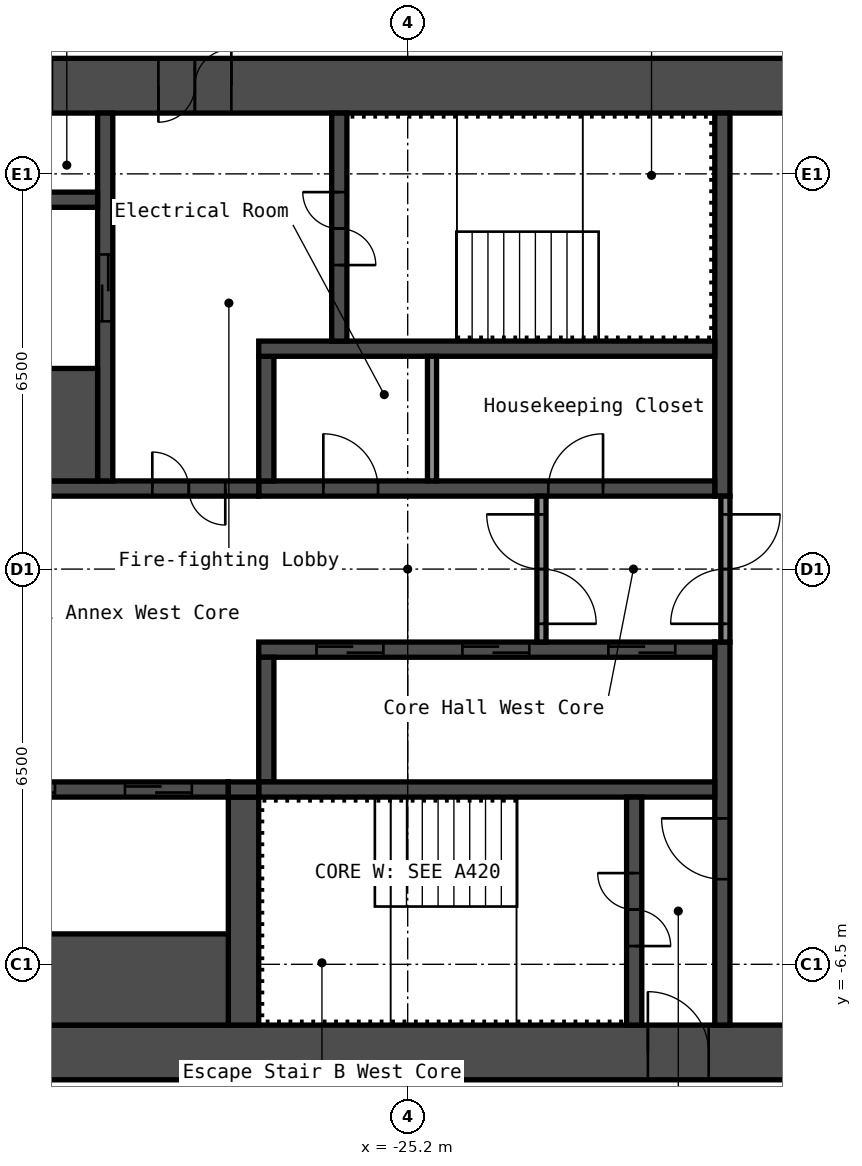
"""IFC4 building model, lengths in metres.
Left out: names, types, materials, properties, quantities, classifications, styles, units other than length and angle.
Written with IfcOpenShell. Run it as: python <this file> out.ifc"""

import sys

from ifc_helpers import new_model, si_unit, direction, frame, frame_2d, origin, place, context, subcontext, project, spatial, rectangle, extrude, element, fill, save


model = new_model("IFC4")
c1 = context("Model", 3, precision=1e-05, world=origin(), true_north=direction((0.0, 1.0)))
c2 = subcontext(c1, "Body", "Model", "MODEL_VIEW")
j1 = project(units=[si_unit("LENGTHUNIT", "METRE"), si_unit("PLANEANGLEUNIT", "RADIAN")], contexts=[c1])
p1 = place(None, origin())
s1 = spatial("IfcSite", under=j1, at=p1, CompositionType="ELEMENT")
p2 = place(p1, origin())
s2 = spatial("IfcBuilding", under=s1, at=p2, CompositionType="ELEMENT")
p3 = place(p2, frame((0.0, 0.0, 131.0)))
s3 = spatial("IfcBuildingStorey", under=s2, at=p3, CompositionType="ELEMENT", Elevation=131.0)
p4 = place(p3, frame((-32.7, 7.95, 0.0), z_axis=(0.0, 0.0, 1.0), x_axis=(1.0, 0.0, 0.0)))
e1 = element("IfcWall", 1, at=p4, inside=s3, PredefinedType="SHEAR", context=c2, shape_type="SweptSolid", body=[
    extrude(rectangle(XDim=15.0, YDim=0.9, at=frame_2d((7.5, 0.0))), origin(), (0.0, 0.0, 1.0), 2.75),
])
p5 = place(p4, frame((3.4, 0.0, 0.0)))
e2 = element("IfcOpeningElement", 2, at=p5, cuts=e1, PredefinedType="OPENING", context=c2, shape_type="SweptSolid", body=[
    extrude(rectangle(XDim=1.2, YDim=2.1, at=frame_2d((0.6, 1.05))), frame((0.0, 0.46, 0.0), z_axis=(0.0, -1.0, 0.0), x_axis=(1.0, 0.0, 0.0)), (0.0, 0.0, 1.0), 0.92),
])
p6 = place(p4, frame((0.75, 0.0, 0.0)))
e3 = element("IfcOpeningElement", 3, at=p6, cuts=e1, PredefinedType="OPENING", context=c2, shape_type="SweptSolid", body=[
    extrude(rectangle(XDim=0.9, YDim=2.1, at=frame_2d((0.45, 1.05))), frame((0.0, 0.46, 0.0), z_axis=(0.0, -1.0, 0.0), x_axis=(1.0, 0.0, 0.0)), (0.0, 0.0, 1.0), 0.92),
])
p7 = place(p3, frame((-32.7, -7.95, 0.0), z_axis=(0.0, 0.0, 1.0), x_axis=(1.0, 0.0, 0.0)))
e4 = element("IfcWall", 4, at=p7, inside=s3, PredefinedType="SHEAR", context=c2, shape_type="SweptSolid", body=[
    extrude(rectangle(XDim=15.0, YDim=0.9, at=frame_2d((7.5, 0.0))), origin(), (0.0, 0.0, 1.0), 2.75),
])
p8 = place(p7, frame((11.45, 0.0, 0.0)))
e5 = element("IfcOpeningElement", 5, at=p8, cuts=e4, PredefinedType="OPENING", context=c2, shape_type="SweptSolid", body=[
    extrude(rectangle(XDim=1.0, YDim=2.1, at=frame_2d((0.5, 1.05))), frame((0.0, 0.46, 0.0), z_axis=(0.0, -1.0, 0.0), x_axis=(1.0, 0.0, 0.0)), (0.0, 0.0, 1.0), 0.92),
])
p9 = place(p3, frame((-20.025, 1.2, 0.0), z_axis=(0.0, 0.0, 1.0), x_axis=(0.0, 1.0, 0.0)))
e6 = element("IfcWall", 6, at=p9, inside=s3, PredefinedType="SHEAR", context=c2, shape_type="SweptSolid", body=[
    extrude(rectangle(XDim=6.3, YDim=0.25, at=frame_2d((3.15, 0.0))), origin(), (0.0, 0.0, 1.0), 2.75),
])
p10 = place(p3, frame((-20.025, -7.5, 0.0), z_axis=(0.0, 0.0, 1.0), x_axis=(0.0, 1.0, 0.0)))
e7 = element("IfcWall", 7, at=p10, inside=s3, PredefinedType="SHEAR", context=c2, shape_type="SweptSolid", body=[
    extrude(rectangle(XDim=6.3, YDim=0.25, at=frame_2d((3.15, 0.0))), origin(), (0.0, 0.0, 1.0), 2.75),
])
p11 = place(p10, frame((2.4, 0.0, 0.0)))
e8 = element("IfcOpeningElement", 8, at=p11, cuts=e7, PredefinedType="OPENING", context=c2, shape_type="SweptSolid", body=[
    extrude(rectangle(XDim=1.0, YDim=2.1, at=frame_2d((0.5, 1.05))), frame((0.0, 0.135, 0.0), z_axis=(0.0, -1.0, 0.0), x_axis=(1.0, 0.0, 0.0)), (0.0, 0.0, 1.0), 0.27),
])
p12 = place(p3, frame((-27.65, 1.325, 0.0), z_axis=(0.0, 0.0, 1.0), x_axis=(1.0, 0.0, 0.0)))
e9 = element("IfcWall", 9, at=p12, inside=s3, PredefinedType="SHEAR", context=c2, shape_type="SweptSolid", body=[
    extrude(rectangle(XDim=7.5, YDim=0.25, at=frame_2d((3.75, 0.0))), origin(), (0.0, 0.0, 1.0), 2.75),
])
p13 = place(p12, frame((4.762, 0.0, 0.0)))
e10 = element("IfcOpeningElement", 10, at=p13, cuts=e9, PredefinedType="OPENING", context=c2, shape_type="SweptSolid", body=[
    extrude(rectangle(XDim=0.9, YDim=2.1, at=frame_2d((0.45, 1.05))), frame((0.0, 0.135, 0.0), z_axis=(0.0, -1.0, 0.0), x_axis=(1.0, 0.0, 0.0)), (0.0, 0.0, 1.0), 0.27),
])
p14 = place(p12, frame((1.062, 0.0, 0.0)))
e11 = element("IfcOpeningElement", 11, at=p14, cuts=e9, PredefinedType="OPENING", context=c2, shape_type="SweptSolid", body=[
    extrude(rectangle(XDim=0.9, YDim=2.1, at=frame_2d((0.45, 1.05))), frame((0.0, 0.135, 0.0), z_axis=(0.0, -1.0, 0.0), x_axis=(1.0, 0.0, 0.0)), (0.0, 0.0, 1.0), 0.27),
])
p15 = place(p3, frame((-27.525, 1.45, 0.0), z_axis=(0.0, 0.0, 1.0), x_axis=(0.0, 1.0, 0.0)))
e12 = element("IfcWall", 12, at=p15, inside=s3, PredefinedType="SHEAR", context=c2, shape_type="SweptSolid", body=[
    extrude(rectangle(XDim=2.05, YDim=0.25, at=frame_2d((1.025, 0.0))), origin(), (0.0, 0.0, 1.0), 2.75),
])
p16 = place(p3, frame((-27.65, 3.625, 0.0), z_axis=(0.0, 0.0, 1.0), x_axis=(1.0, 0.0, 0.0)))
e13 = element("IfcWall", 13, at=p16, inside=s3, PredefinedType="SHEAR", context=c2, shape_type="SweptSolid", body=[
    extrude(rectangle(XDim=7.5, YDim=0.25, at=frame_2d((3.75, 0.0))), origin(), (0.0, 0.0, 1.0), 2.75),
])
p17 = place(p3, frame((-26.325, 3.75, 0.0), z_axis=(0.0, 0.0, 1.0), x_axis=(0.0, 1.0, 0.0)))
e14 = element("IfcWall", 14, at=p17, inside=s3, PredefinedType="SHEAR", context=c2, shape_type="SweptSolid", body=[
    extrude(rectangle(XDim=3.75, YDim=0.25, at=frame_2d((1.875, 0.0))), origin(), (0.0, 0.0, 1.0), 2.75),
])
p18 = place(p17, frame((1.25, 0.0, 0.0)))
e15 = element("IfcOpeningElement", 15, at=p18, cuts=e14, PredefinedType="OPENING", context=c2, shape_type="SweptSolid", body=[
    extrude(rectangle(XDim=1.2, YDim=2.1, at=frame_2d((0.6, 1.05))), frame((0.0, 0.135, 0.0), z_axis=(0.0, -1.0, 0.0), x_axis=(1.0, 0.0, 0.0)), (0.0, 0.0, 1.0), 0.27),
])
p19 = place(p3, frame((-32.7, 1.325, 0.0), z_axis=(0.0, 0.0, 1.0), x_axis=(1.0, 0.0, 0.0)))
e16 = element("IfcWall", 16, at=p19, inside=s3, PredefinedType="SHEAR", context=c2, shape_type="SweptSolid", body=[
    extrude(rectangle(XDim=5.05, YDim=0.25, at=frame_2d((2.525, 0.0))), origin(), (0.0, 0.0, 1.0), 2.75),
])
p20 = place(p19, frame((3.3, 0.0, 0.0)))
e17 = element("IfcOpeningElement", 17, at=p20, cuts=e16, PredefinedType="OPENING", context=c2, shape_type="SweptSolid", body=[
    extrude(rectangle(XDim=1.2, YDim=2.1, at=frame_2d((0.6, 1.05))), frame((0.0, 0.135, 0.0), z_axis=(0.0, -1.0, 0.0), x_axis=(1.0, 0.0, 0.0)), (0.0, 0.0, 1.0), 0.27),
])
p21 = place(p3, frame((-30.175, 1.45, 0.0), z_axis=(0.0, 0.0, 1.0), x_axis=(0.0, 1.0, 0.0)))
e18 = element("IfcWall", 18, at=p21, inside=s3, PredefinedType="SHEAR", context=c2, shape_type="SweptSolid", body=[
    extrude(rectangle(XDim=6.05, YDim=0.25, at=frame_2d((3.025, 0.0))), origin(), (0.0, 0.0, 1.0), 2.75),
])
p22 = place(p21, frame((2.625, 0.0, 0.0)))
e19 = element("IfcOpeningElement", 19, at=p22, cuts=e18, PredefinedType="OPENING", context=c2, shape_type="SweptSolid", body=[
    extrude(rectangle(XDim=1.1, YDim=2.1, at=frame_2d((0.55, 1.05))), frame((0.0, 0.135, 0.0), z_axis=(0.0, -1.0, 0.0), x_axis=(1.0, 0.0, 0.0)), (0.0, 0.0, 1.0), 0.27),
])
p23 = place(p3, frame((-32.7, 2.375, 0.0), z_axis=(0.0, 0.0, 1.0), x_axis=(1.0, 0.0, 0.0)))
e20 = element("IfcWall", 20, at=p23, inside=s3, PredefinedType="SHEAR", context=c2, shape_type="SweptSolid", body=[
    extrude(rectangle(XDim=2.4, YDim=1.85, at=frame_2d((1.2, 0.0))), origin(), (0.0, 0.0, 1.0), 2.75),
])
p24 = place(p3, frame((-32.7, 6.075, 0.0), z_axis=(0.0, 0.0, 1.0), x_axis=(1.0, 0.0, 0.0)))
e21 = element("IfcWall", 21, at=p24, inside=s3, PredefinedType="SHEAR", context=c2, shape_type="SweptSolid", body=[
    extrude(rectangle(XDim=2.4, YDim=0.25, at=frame_2d((1.2, 0.0))), origin(), (0.0, 0.0, 1.0), 2.75),
])
p25 = place(p3, frame((-27.65, -1.325, 0.0), z_axis=(0.0, 0.0, 1.0), x_axis=(1.0, 0.0, 0.0)))
e22 = element("IfcWall", 22, at=p25, inside=s3, PredefinedType="SHEAR", context=c2, shape_type="SweptSolid", body=[
    extrude(rectangle(XDim=7.5, YDim=0.25, at=frame_2d((3.75, 0.0))), origin(), (0.0, 0.0, 1.0), 2.75),
])
p26 = place(p25, frame((5.75, 0.0, 0.0)))
e23 = element("IfcOpeningElement", 23, at=p26, cuts=e22, PredefinedType="OPENING", context=c2, shape_type="SweptSolid", body=[
    extrude(rectangle(XDim=1.1, YDim=2.1, at=frame_2d((0.55, 1.05))), frame((0.0, 0.135, 0.0), z_axis=(0.0, -1.0, 0.0), x_axis=(1.0, 0.0, 0.0)), (0.0, 0.0, 1.0), 0.27),
])
p27 = place(p25, frame((3.35, 0.0, 0.0)))
e24 = element("IfcOpeningElement", 24, at=p27, cuts=e22, PredefinedType="OPENING", context=c2, shape_type="SweptSolid", body=[
    extrude(rectangle(XDim=1.1, YDim=2.1, at=frame_2d((0.55, 1.05))), frame((0.0, 0.135, 0.0), z_axis=(0.0, -1.0, 0.0), x_axis=(1.0, 0.0, 0.0)), (0.0, 0.0, 1.0), 0.27),
])
p28 = place(p25, frame((0.95, 0.0, 0.0)))
e25 = element("IfcOpeningElement", 25, at=p28, cuts=e22, PredefinedType="OPENING", context=c2, shape_type="SweptSolid", body=[
    extrude(rectangle(XDim=1.1, YDim=2.1, at=frame_2d((0.55, 1.05))), frame((0.0, 0.135, 0.0), z_axis=(0.0, -1.0, 0.0), x_axis=(1.0, 0.0, 0.0)), (0.0, 0.0, 1.0), 0.27),
])
p29 = place(p3, frame((-27.525, -3.5, 0.0), z_axis=(0.0, 0.0, 1.0), x_axis=(0.0, 1.0, 0.0)))
e26 = element("IfcWall", 26, at=p29, inside=s3, PredefinedType="SHEAR", context=c2, shape_type="SweptSolid", body=[
    extrude(rectangle(XDim=2.05, YDim=0.25, at=frame_2d((1.025, 0.0))), origin(), (0.0, 0.0, 1.0), 2.75),
])
p30 = place(p3, frame((-27.65, -3.625, 0.0), z_axis=(0.0, 0.0, 1.0), x_axis=(1.0, 0.0, 0.0)))
e27 = element("IfcWall", 27, at=p30, inside=s3, PredefinedType="SHEAR", context=c2, shape_type="SweptSolid", body=[
    extrude(rectangle(XDim=7.5, YDim=0.25, at=frame_2d((3.75, 0.0))), origin(), (0.0, 0.0, 1.0), 2.75),
])
p31 = place(p3, frame((-21.475, -7.5, 0.0), z_axis=(0.0, 0.0, 1.0), x_axis=(0.0, 1.0, 0.0)))
e28 = element("IfcWall", 28, at=p31, inside=s3, PredefinedType="SHEAR", context=c2, shape_type="SweptSolid", body=[
    extrude(rectangle(XDim=3.75, YDim=0.25, at=frame_2d((1.875, 0.0))), origin(), (0.0, 0.0, 1.0), 2.75),
])
p32 = place(p31, frame((1.3, 0.0, 0.0)))
e29 = element("IfcOpeningElement", 29, at=p32, cuts=e28, PredefinedType="OPENING", context=c2, shape_type="SweptSolid", body=[
    extrude(rectangle(XDim=1.2, YDim=2.1, at=frame_2d((0.6, 1.05))), frame((0.0, 0.135, 0.0), z_axis=(0.0, -1.0, 0.0), x_axis=(1.0, 0.0, 0.0)), (0.0, 0.0, 1.0), 0.27),
])
p33 = place(p3, frame((-27.9, -7.5, 0.0), z_axis=(0.0, 0.0, 1.0), x_axis=(0.0, 1.0, 0.0)))
e30 = element("IfcWall", 30, at=p33, inside=s3, PredefinedType="SHEAR", context=c2, shape_type="SweptSolid", body=[
    extrude(rectangle(XDim=3.75, YDim=0.5, at=frame_2d((1.875, 0.0))), origin(), (0.0, 0.0, 1.0), 2.75),
])
p34 = place(p3, frame((-32.7, -3.625, 0.0), z_axis=(0.0, 0.0, 1.0), x_axis=(1.0, 0.0, 0.0)))
e31 = element("IfcWall", 31, at=p34, inside=s3, PredefinedType="SHEAR", context=c2, shape_type="SweptSolid", body=[
    extrude(rectangle(XDim=4.55, YDim=0.25, at=frame_2d((2.275, 0.0))), origin(), (0.0, 0.0, 1.0), 2.75),
])
p35 = place(p34, frame((2.85, 0.0, 0.0)))
e32 = element("IfcOpeningElement", 32, at=p35, cuts=e31, PredefinedType="OPENING", context=c2, shape_type="SweptSolid", body=[
    extrude(rectangle(XDim=1.1, YDim=2.1, at=frame_2d((0.55, 1.05))), frame((0.0, 0.135, 0.0), z_axis=(0.0, -1.0, 0.0), x_axis=(1.0, 0.0, 0.0)), (0.0, 0.0, 1.0), 0.27),
])
p36 = place(p34, frame((0.6, 0.0, 0.0)))
e33 = element("IfcOpeningElement", 33, at=p36, cuts=e31, PredefinedType="OPENING", context=c2, shape_type="SweptSolid", body=[
    extrude(rectangle(XDim=1.1, YDim=2.1, at=frame_2d((0.55, 1.05))), frame((0.0, 0.135, 0.0), z_axis=(0.0, -1.0, 0.0), x_axis=(1.0, 0.0, 0.0)), (0.0, 0.0, 1.0), 0.27),
])
p37 = place(p3, frame((-32.7, -6.75, 0.0), z_axis=(0.0, 0.0, 1.0), x_axis=(1.0, 0.0, 0.0)))
e34 = element("IfcWall", 34, at=p37, inside=s3, PredefinedType="SHEAR", context=c2, shape_type="SweptSolid", body=[
    extrude(rectangle(XDim=4.55, YDim=1.5, at=frame_2d((2.275, 0.0))), origin(), (0.0, 0.0, 1.0), 2.75),
])
p38 = place(p3, frame((-28.15, -3.625, 0.0), z_axis=(0.0, 0.0, 1.0), x_axis=(1.0, 0.0, 0.0)))
e35 = element("IfcWall", 35, at=p38, inside=s3, PredefinedType="SHEAR", context=c2, shape_type="SweptSolid", body=[
    extrude(rectangle(XDim=0.5, YDim=0.25, at=frame_2d((0.25, 0.0))), origin(), (0.0, 0.0, 1.0), 2.75),
])
p39 = place(p3, frame((-19.975, -1.2, 0.0), z_axis=(0.0, 0.0, 1.0), x_axis=(0.0, 1.0, 0.0)))
e36 = element("IfcWall", 36, at=p39, inside=s3, PredefinedType="PARTITIONING", context=c2, shape_type="SweptSolid", body=[
    extrude(rectangle(XDim=2.4, YDim=0.15, at=frame_2d((1.2, 0.0))), origin(), (0.0, 0.0, 1.0), 2.75),
])
p40 = place(p39, frame((0.3, 0.0, 0.0)))
e37 = element("IfcOpeningElement", 37, at=p40, cuts=e36, PredefinedType="OPENING", context=c2, shape_type="SweptSolid", body=[
    extrude(rectangle(XDim=1.8, YDim=2.1, at=frame_2d((0.9, 1.05))), frame((0.0, 0.085, 0.0), z_axis=(0.0, -1.0, 0.0), x_axis=(1.0, 0.0, 0.0)), (0.0, 0.0, 1.0), 0.17),
])
p41 = place(p3, frame((-23.0, -1.2, 0.0), z_axis=(0.0, 0.0, 1.0), x_axis=(0.0, 1.0, 0.0)))
e38 = element("IfcWall", 38, at=p41, inside=s3, PredefinedType="PARTITIONING", context=c2, shape_type="SweptSolid", body=[
    extrude(rectangle(XDim=2.4, YDim=0.15, at=frame_2d((1.2, 0.0))), origin(), (0.0, 0.0, 1.0), 2.75),
])
p42 = place(p41, frame((0.3, 0.0, 0.0)))
e39 = element("IfcOpeningElement", 39, at=p42, cuts=e38, PredefinedType="OPENING", context=c2, shape_type="SweptSolid", body=[
    extrude(rectangle(XDim=1.8, YDim=2.1, at=frame_2d((0.9, 1.05))), frame((0.0, 0.085, 0.0), z_axis=(0.0, -1.0, 0.0), x_axis=(1.0, 0.0, 0.0)), (0.0, 0.0, 1.0), 0.17),
])
p43 = place(p3, frame((-24.8, 1.45, 0.0), z_axis=(0.0, 0.0, 1.0), x_axis=(0.0, 1.0, 0.0)))
e40 = element("IfcWall", 40, at=p43, inside=s3, PredefinedType="PARTITIONING", context=c2, shape_type="SweptSolid", body=[
    extrude(rectangle(XDim=2.05, YDim=0.15, at=frame_2d((1.025, 0.0))), origin(), (0.0, 0.0, 1.0), 2.75),
])
p44 = place(p5, origin())
e41 = element("IfcDoor", 41, at=p44, inside=s3, OperationType="DOUBLE_DOOR_SINGLE_SWING", PredefinedType="DOOR", context=c2, shape_type="SweptSolid", body=[
    extrude(rectangle(XDim=1.2, YDim=2.1, at=frame_2d((0.6, 1.05))), frame((0.0, 0.025, 0.0), z_axis=(0.0, -1.0, 0.0), x_axis=(1.0, 0.0, 0.0)), (0.0, 0.0, 1.0), 0.05),
])
fill(e2, e41)
p45 = place(p8, origin())
e42 = element("IfcDoor", 42, at=p45, inside=s3, OperationType="SINGLE_SWING_RIGHT", PredefinedType="DOOR", context=c2, shape_type="SweptSolid", body=[
    extrude(rectangle(XDim=1.0, YDim=2.1, at=frame_2d((0.5, 1.05))), frame((0.0, 0.025, 0.0), z_axis=(0.0, -1.0, 0.0), x_axis=(1.0, 0.0, 0.0)), (0.0, 0.0, 1.0), 0.05),
])
fill(e5, e42)
p46 = place(p18, origin())
e43 = element("IfcDoor", 43, at=p46, inside=s3, OperationType="DOUBLE_DOOR_SINGLE_SWING", PredefinedType="DOOR", context=c2, shape_type="SweptSolid", body=[
    extrude(rectangle(XDim=1.2, YDim=2.1, at=frame_2d((0.6, 1.05))), frame((0.0, 0.025, 0.0), z_axis=(0.0, -1.0, 0.0), x_axis=(1.0, 0.0, 0.0)), (0.0, 0.0, 1.0), 0.05),
])
fill(e15, e43)
p47 = place(p32, origin())
e44 = element("IfcDoor", 44, at=p47, inside=s3, OperationType="DOUBLE_DOOR_SINGLE_SWING", PredefinedType="DOOR", context=c2, shape_type="SweptSolid", body=[
    extrude(rectangle(XDim=1.2, YDim=2.1, at=frame_2d((0.6, 1.05))), frame((0.0, 0.025, 0.0), z_axis=(0.0, -1.0, 0.0), x_axis=(1.0, 0.0, 0.0)), (0.0, 0.0, 1.0), 0.05),
])
fill(e29, e44)
p48 = place(p11, origin())
e45 = element("IfcDoor", 45, at=p48, inside=s3, OperationType="SINGLE_SWING_LEFT", PredefinedType="DOOR", context=c2, shape_type="SweptSolid", body=[
    extrude(rectangle(XDim=1.0, YDim=2.1, at=frame_2d((0.5, 1.05))), frame((0.0, 0.025, 0.0), z_axis=(0.0, -1.0, 0.0), x_axis=(1.0, 0.0, 0.0)), (0.0, 0.0, 1.0), 0.05),
])
fill(e8, e45)
p49 = place(p20, origin())
e46 = element("IfcDoor", 46, at=p49, inside=s3, OperationType="DOUBLE_DOOR_SINGLE_SWING", PredefinedType="DOOR", context=c2, shape_type="SweptSolid", body=[
    extrude(rectangle(XDim=1.2, YDim=2.1, at=frame_2d((0.6, 1.05))), frame((0.0, 0.025, 0.0), z_axis=(0.0, -1.0, 0.0), x_axis=(1.0, 0.0, 0.0)), (0.0, 0.0, 1.0), 0.05),
])
fill(e17, e46)
p50 = place(p40, origin())
e47 = element("IfcDoor", 47, at=p50, inside=s3, OperationType="DOUBLE_DOOR_SINGLE_SWING", PredefinedType="DOOR", context=c2, shape_type="SweptSolid", body=[
    extrude(rectangle(XDim=1.8, YDim=2.1, at=frame_2d((0.9, 1.05))), frame((0.0, 0.025, 0.0), z_axis=(0.0, -1.0, 0.0), x_axis=(1.0, 0.0, 0.0)), (0.0, 0.0, 1.0), 0.05),
])
fill(e37, e47)
p51 = place(p42, origin())
e48 = element("IfcDoor", 48, at=p51, inside=s3, OperationType="DOUBLE_DOOR_SINGLE_SWING", PredefinedType="DOOR", context=c2, shape_type="SweptSolid", body=[
    extrude(rectangle(XDim=1.8, YDim=2.1, at=frame_2d((0.9, 1.05))), frame((0.0, 0.025, 0.0), z_axis=(0.0, -1.0, 0.0), x_axis=(1.0, 0.0, 0.0)), (0.0, 0.0, 1.0), 0.05),
])
fill(e39, e48)
p52 = place(p13, origin())
e49 = element("IfcDoor", 49, at=p52, inside=s3, OperationType="SINGLE_SWING_LEFT", PredefinedType="DOOR", context=c2, shape_type="SweptSolid", body=[
    extrude(rectangle(XDim=0.9, YDim=2.1, at=frame_2d((0.45, 1.05))), frame((0.0, 0.025, 0.0), z_axis=(0.0, -1.0, 0.0), x_axis=(1.0, 0.0, 0.0)), (0.0, 0.0, 1.0), 0.05),
])
fill(e10, e49)
p53 = place(p14, origin())
e50 = element("IfcDoor", 50, at=p53, inside=s3, OperationType="SINGLE_SWING_RIGHT", PredefinedType="DOOR", context=c2, shape_type="SweptSolid", body=[
    extrude(rectangle(XDim=0.9, YDim=2.1, at=frame_2d((0.45, 1.05))), frame((0.0, 0.025, 0.0), z_axis=(0.0, -1.0, 0.0), x_axis=(1.0, 0.0, 0.0)), (0.0, 0.0, 1.0), 0.05),
])
fill(e11, e50)
p54 = place(p26, origin())
e51 = element("IfcDoor", 51, at=p54, inside=s3, OperationType="DOUBLE_DOOR_SLIDING", PredefinedType="DOOR", context=c2, shape_type="SweptSolid", body=[
    extrude(rectangle(XDim=1.1, YDim=2.1, at=frame_2d((0.55, 1.05))), frame((0.0, 0.025, 0.0), z_axis=(0.0, -1.0, 0.0), x_axis=(1.0, 0.0, 0.0)), (0.0, 0.0, 1.0), 0.05),
])
fill(e23, e51)
p55 = place(p27, origin())
e52 = element("IfcDoor", 52, at=p55, inside=s3, OperationType="DOUBLE_DOOR_SLIDING", PredefinedType="DOOR", context=c2, shape_type="SweptSolid", body=[
    extrude(rectangle(XDim=1.1, YDim=2.1, at=frame_2d((0.55, 1.05))), frame((0.0, 0.025, 0.0), z_axis=(0.0, -1.0, 0.0), x_axis=(1.0, 0.0, 0.0)), (0.0, 0.0, 1.0), 0.05),
])
fill(e24, e52)
p56 = place(p28, origin())
e53 = element("IfcDoor", 53, at=p56, inside=s3, OperationType="DOUBLE_DOOR_SLIDING", PredefinedType="DOOR", context=c2, shape_type="SweptSolid", body=[
    extrude(rectangle(XDim=1.1, YDim=2.1, at=frame_2d((0.55, 1.05))), frame((0.0, 0.025, 0.0), z_axis=(0.0, -1.0, 0.0), x_axis=(1.0, 0.0, 0.0)), (0.0, 0.0, 1.0), 0.05),
])
fill(e25, e53)
p57 = place(p22, origin())
e54 = element("IfcDoor", 54, at=p57, inside=s3, OperationType="DOUBLE_DOOR_SLIDING", PredefinedType="DOOR", context=c2, shape_type="SweptSolid", body=[
    extrude(rectangle(XDim=1.1, YDim=2.1, at=frame_2d((0.55, 1.05))), frame((0.0, 0.025, 0.0), z_axis=(0.0, -1.0, 0.0), x_axis=(1.0, 0.0, 0.0)), (0.0, 0.0, 1.0), 0.05),
])
fill(e19, e54)
p58 = place(p35, origin())
e55 = element("IfcDoor", 55, at=p58, inside=s3, OperationType="DOUBLE_DOOR_SLIDING", PredefinedType="DOOR", context=c2, shape_type="SweptSolid", body=[
    extrude(rectangle(XDim=1.1, YDim=2.1, at=frame_2d((0.55, 1.05))), frame((0.0, 0.025, 0.0), z_axis=(0.0, -1.0, 0.0), x_axis=(1.0, 0.0, 0.0)), (0.0, 0.0, 1.0), 0.05),
])
fill(e32, e55)
p59 = place(p36, origin())
e56 = element("IfcDoor", 56, at=p59, inside=s3, OperationType="DOUBLE_DOOR_SLIDING", PredefinedType="DOOR", context=c2, shape_type="SweptSolid", body=[
    extrude(rectangle(XDim=1.1, YDim=2.1, at=frame_2d((0.55, 1.05))), frame((0.0, 0.025, 0.0), z_axis=(0.0, -1.0, 0.0), x_axis=(1.0, 0.0, 0.0)), (0.0, 0.0, 1.0), 0.05),
])
fill(e33, e56)
save(model, sys.argv[1])
